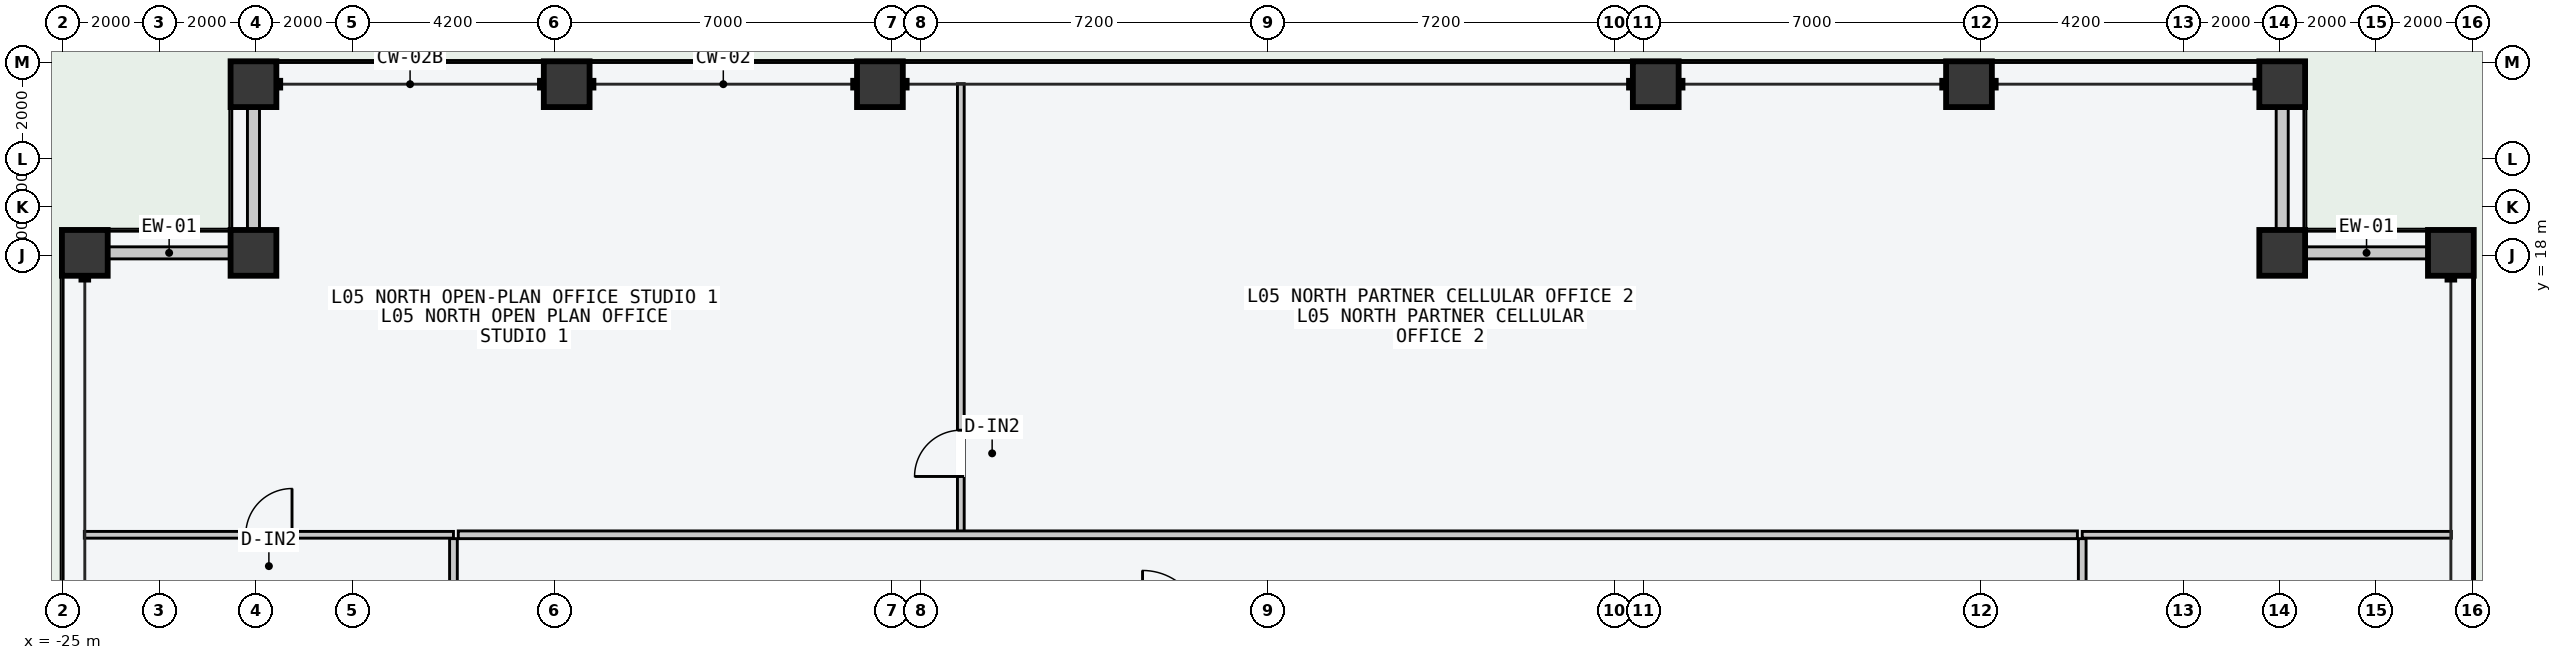
"""IFC4 building model, lengths in metres.
Left out: names, types, materials, properties, quantities, classifications, styles, units other than length and angle.
Written with IfcOpenShell. Run it as: python <this file> out.ifc"""

import sys

from ifc_helpers import new_model, si_unit, direction, frame, frame_2d, origin, origin_2d, place, context, subcontext, project, spatial, rectangle, hollow_rectangle, extrude, element, fill, save


model = new_model("IFC4")
c1 = context("Model", 3, precision=1e-05, world=origin(), true_north=direction((0.0, 1.0)))
c2 = subcontext(c1, "Body", "Model", "MODEL_VIEW")
j1 = project(units=[si_unit("LENGTHUNIT", "METRE"), si_unit("PLANEANGLEUNIT", "RADIAN")], contexts=[c1])
p1 = place(None, origin())
s1 = spatial("IfcSite", under=j1, at=p1, CompositionType="ELEMENT")
p2 = place(p1, origin())
s2 = spatial("IfcBuilding", under=s1, at=p2, CompositionType="ELEMENT")
p3 = place(p2, frame((0.0, 0.0, 24.0)))
s3 = spatial("IfcBuildingStorey", under=s2, at=p3, CompositionType="ELEMENT", Elevation=24.0)
for number, where, z_axis, x_axis in (
    (1, (-21.05, 21.55, -0.2), (0.0, 0.0, 1.0), (1.0, 0.0, 0.0)),
    (2, (-14.55, 21.55, -0.2), (0.0, 0.0, 1.0), (1.0, 0.0, 0.0)),
    (3, (-8.05, 21.55, -0.2), (0.0, 0.0, 1.0), (1.0, 0.0, 0.0)),
    (4, (8.05, 21.55, -0.2), (0.0, 0.0, 1.0), (1.0, 0.0, 0.0)),
    (5, (14.55, 21.55, -0.2), (0.0, 0.0, 1.0), (1.0, 0.0, 0.0)),
    (6, (21.05, 21.55, -0.2), (0.0, 0.0, 1.0), (1.0, 0.0, 0.0)),
    (7, (-24.55, 18.05, -0.2), (0.0, 0.0, 1.0), (0.0, 1.0, 0.0)),
    (8, (24.55, 18.05, -0.2), (0.0, 0.0, 1.0), (0.0, 1.0, 0.0)),
):
    element("IfcColumn", number, at=place(p3, frame(where, z_axis=z_axis, x_axis=x_axis)), inside=s3, PredefinedType="COLUMN", context=c2, shape_type="SweptSolid", body=[
        extrude(hollow_rectangle(XDim=0.95, YDim=0.95, WallThickness=0.048, at=origin_2d()), origin(), (0.0, 0.0, 1.0), 3.8),
    ])
for number, where, z_axis, x_axis in (
    (9, (-21.05, 18.05, 0.0), (0.0, 0.0, 1.0), (1.0, 0.0, 0.0)),
    (10, (21.05, 18.05, 0.0), (0.0, 0.0, 1.0), (1.0, 0.0, 0.0)),
):
    element("IfcColumn", number, at=place(p3, frame(where, z_axis=z_axis, x_axis=x_axis)), inside=s3, PredefinedType="COLUMN", context=c2, shape_type="SweptSolid", body=[
        extrude(hollow_rectangle(XDim=0.95, YDim=0.95, WallThickness=0.048, at=origin_2d()), origin(), (0.0, 0.0, 1.0), 3.6),
    ])
for number, where, z_axis, x_axis in (
    (11, (-24.065, 18.05, 0.0), (0.0, 0.0, 1.0), (1.0, 0.0, 0.0)),
    (12, (-21.05, 18.535, 0.0), (0.0, 0.0, 1.0), (0.0, 1.0, 0.0)),
):
    element("IfcWall", number, at=place(p3, frame(where, z_axis=z_axis, x_axis=x_axis)), inside=s3, PredefinedType="STANDARD", context=c2, shape_type="SweptSolid", body=[
        extrude(rectangle(XDim=2.53, YDim=0.25, at=frame_2d((1.265, 0.0))), origin(), (0.0, 0.0, 1.0), 2.7),
    ])
for number, where, z_axis, x_axis in (
    (13, (21.535, 18.05, 0.0), (0.0, 0.0, 1.0), (1.0, 0.0, 0.0)),
    (14, (21.05, 18.535, 0.0), (0.0, 0.0, 1.0), (0.0, 1.0, 0.0)),
):
    element("IfcWall", number, at=place(p3, frame(where, z_axis=z_axis, x_axis=x_axis)), inside=s3, PredefinedType="STANDARD", context=c2, shape_type="SweptSolid", body=[
        extrude(rectangle(XDim=2.53, YDim=0.25, at=frame_2d((1.265, 0.0))), origin(), (0.0, 0.0, 1.0), 1.74),
    ])
p4 = place(p3, frame((-6.371, 12.26, 0.0), z_axis=(0.0, 0.0, 1.0), x_axis=(0.0, 1.0, 0.0)))
e15 = element("IfcWall", 15, at=p4, inside=s3, PredefinedType="PARTITIONING", context=c2, shape_type="SweptSolid", body=[
    extrude(rectangle(XDim=9.3, YDim=0.14, at=frame_2d((4.65, 0.0))), origin(), (0.0, 0.0, 1.0), 3.4),
])
p5 = place(p4, frame((1.15, 0.0, 0.0)))
e16 = element("IfcOpeningElement", 16, at=p5, cuts=e15, PredefinedType="OPENING", context=c2, shape_type="SweptSolid", body=[
    extrude(rectangle(XDim=0.96, YDim=2.18, at=frame_2d((0.48, 1.09))), frame((0.0, 0.08, 0.0), z_axis=(0.0, -1.0, 0.0), x_axis=(1.0, 0.0, 0.0)), (0.0, 0.0, 1.0), 0.16),
])
p6 = place(p3, frame((-16.8, 12.2, 0.0), z_axis=(0.0, 0.0, 1.0), x_axis=(1.0, 0.0, 0.0)))
e17 = element("IfcWall", 17, at=p6, inside=s3, PredefinedType="PARTITIONING", context=c2, shape_type="SweptSolid", body=[
    extrude(rectangle(XDim=33.6, YDim=0.16, at=frame_2d((16.8, 0.0))), origin(), (0.0, 0.0, 1.0), 1.74),
])
p7 = place(p3, frame((-24.56, 12.2, 0.0), z_axis=(0.0, 0.0, 1.0), x_axis=(1.0, 0.0, 0.0)))
e18 = element("IfcWall", 18, at=p7, inside=s3, PredefinedType="PARTITIONING", context=c2, shape_type="SweptSolid", body=[
    extrude(rectangle(XDim=7.66, YDim=0.14, at=frame_2d((3.83, 0.0))), origin(), (0.0, 0.0, 1.0), 3.4),
])
p8 = place(p7, frame((3.35, 0.0, 0.0)))
e19 = element("IfcOpeningElement", 19, at=p8, cuts=e18, PredefinedType="OPENING", context=c2, shape_type="SweptSolid", body=[
    extrude(rectangle(XDim=0.96, YDim=2.18, at=frame_2d((0.48, 1.09))), frame((0.0, 0.08, 0.0), z_axis=(0.0, -1.0, 0.0), x_axis=(1.0, 0.0, 0.0)), (0.0, 0.0, 1.0), 0.16),
])
p9 = place(p3, frame((16.9, 12.2, 0.0), z_axis=(0.0, 0.0, 1.0), x_axis=(1.0, 0.0, 0.0)))
e20 = element("IfcWall", 20, at=p9, inside=s3, PredefinedType="PARTITIONING", context=c2, shape_type="SweptSolid", body=[
    extrude(rectangle(XDim=7.66, YDim=0.14, at=frame_2d((3.83, 0.0))), origin(), (0.0, 0.0, 1.0), 1.74),
])
p10 = place(p3, frame((-16.9, -12.12, 0.0), z_axis=(0.0, 0.0, 1.0), x_axis=(0.0, 1.0, 0.0)))
e21 = element("IfcWall", 21, at=p10, inside=s3, PredefinedType="PARTITIONING", context=c2, shape_type="SweptSolid", body=[
    extrude(rectangle(XDim=24.24, YDim=0.16, at=frame_2d((12.12, 0.0))), origin(), (0.0, 0.0, 1.0), 3.4),
])
p11 = place(p10, frame((11.61, 0.0, 0.0)))
e22 = element("IfcOpeningElement", 22, at=p11, cuts=e21, PredefinedType="OPENING", context=c2, shape_type="SweptSolid", body=[
    extrude(rectangle(XDim=1.02, YDim=2.2, at=frame_2d((0.51, 1.1))), frame((0.0, 0.09, 0.0), z_axis=(0.0, -1.0, 0.0), x_axis=(1.0, 0.0, 0.0)), (0.0, 0.0, 1.0), 0.18),
])
p12 = place(p3, frame((16.9, -12.12, 0.0), z_axis=(0.0, 0.0, 1.0), x_axis=(0.0, 1.0, 0.0)))
e23 = element("IfcWall", 23, at=p12, inside=s3, PredefinedType="PARTITIONING", context=c2, shape_type="SweptSolid", body=[
    extrude(rectangle(XDim=24.24, YDim=0.16, at=frame_2d((12.12, 0.0))), origin(), (0.0, 0.0, 1.0), 3.4),
])
p13 = place(p12, frame((3.611, 0.0, 0.0)))
e24 = element("IfcOpeningElement", 24, at=p13, cuts=e23, PredefinedType="OPENING", context=c2, shape_type="SweptSolid", body=[
    extrude(rectangle(XDim=1.02, YDim=2.2, at=frame_2d((0.51, 1.1))), frame((0.0, 0.09, 0.0), z_axis=(0.0, -1.0, 0.0), x_axis=(1.0, 0.0, 0.0)), (0.0, 0.0, 1.0), 0.18),
])
p14 = place(p12, frame((15.711, 0.0, 0.0)))
e25 = element("IfcOpeningElement", 25, at=p14, cuts=e23, PredefinedType="OPENING", context=c2, shape_type="SweptSolid", body=[
    extrude(rectangle(XDim=1.06, YDim=2.2, at=frame_2d((0.53, 1.1))), frame((0.0, 0.09, 0.0), z_axis=(0.0, -1.0, 0.0), x_axis=(1.0, 0.0, 0.0)), (0.0, 0.0, 1.0), 0.18),
])
p15 = place(p5, origin())
e26 = element("IfcDoor", 26, at=p15, inside=s3, OperationType="SINGLE_SWING_LEFT", PredefinedType="DOOR", context=c2, shape_type="SweptSolid", body=[
    extrude(rectangle(XDim=0.96, YDim=2.18, at=frame_2d((0.48, 1.09))), frame((0.0, 0.025, 0.0), z_axis=(0.0, -1.0, 0.0), x_axis=(1.0, 0.0, 0.0)), (0.0, 0.0, 1.0), 0.05),
])
fill(e16, e26)
p16 = place(p8, origin())
e27 = element("IfcDoor", 27, at=p16, inside=s3, OperationType="SINGLE_SWING_RIGHT", PredefinedType="DOOR", context=c2, shape_type="SweptSolid", body=[
    extrude(rectangle(XDim=0.96, YDim=2.18, at=frame_2d((0.48, 1.09))), frame((0.0, 0.025, 0.0), z_axis=(0.0, -1.0, 0.0), x_axis=(1.0, 0.0, 0.0)), (0.0, 0.0, 1.0), 0.05),
])
fill(e19, e27)
save(model, sys.argv[1])
